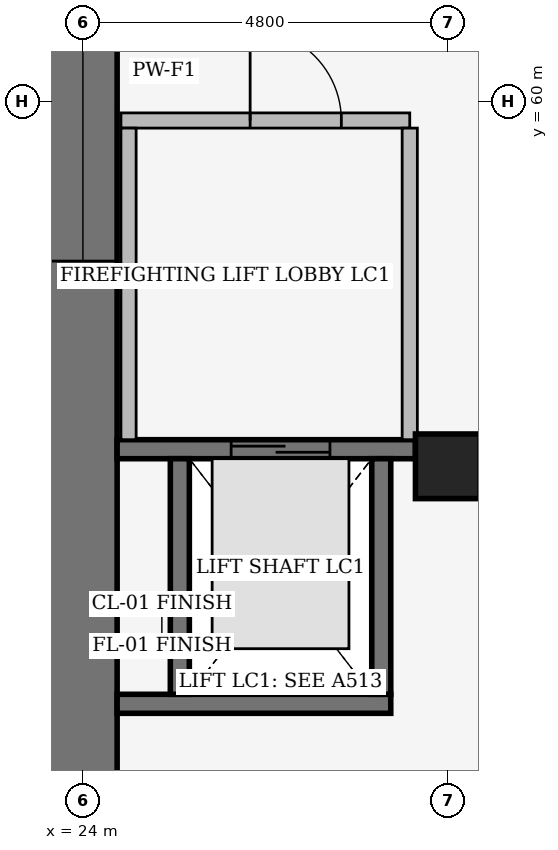
"""IFC4 building model, lengths in metres.
Left out: names, types, materials, properties, quantities, classifications, styles, units other than length and angle.
Written with IfcOpenShell. Run it as: python <this file> out.ifc"""

import sys

from ifc_helpers import new_model, si_unit, direction, frame, frame_2d, origin, origin_2d, place, context, subcontext, project, spatial, rectangle, extrude, element, fill, save


model = new_model("IFC4")
c1 = context("Model", 3, precision=1e-05, world=origin(), true_north=direction((0.0, 1.0)))
c2 = subcontext(c1, "Body", "Model", "MODEL_VIEW")
j1 = project(units=[si_unit("LENGTHUNIT", "METRE"), si_unit("PLANEANGLEUNIT", "RADIAN")], contexts=[c1])
p1 = place(None, origin())
s1 = spatial("IfcSite", under=j1, at=p1, CompositionType="ELEMENT")
p2 = place(p1, origin())
s2 = spatial("IfcBuilding", under=s1, at=p2, CompositionType="ELEMENT")
p3 = place(p2, origin())
s3 = spatial("IfcBuildingStorey", under=s2, at=p3, CompositionType="ELEMENT", Elevation=0.0)
p4 = place(p3, frame((28.8, 55.2, 0.0), z_axis=(0.0, 0.0, 1.0), x_axis=(1.0, 0.0, 0.0)))
e1 = element("IfcColumn", 1, at=p4, inside=s3, PredefinedType="COLUMN", context=c2, shape_type="SweptSolid", body=[
    extrude(rectangle(XDim=0.85, YDim=0.85, at=origin_2d()), origin(), (0.0, 0.0, 1.0), 5.4),
])
p5 = place(p3, frame((24.0, 50.85, 0.0), z_axis=(0.0, 0.0, 1.0), x_axis=(0.0, 1.0, 0.0)))
e2 = element("IfcWall", 2, at=p5, inside=s3, PredefinedType="SOLIDWALL", context=c2, shape_type="SweptSolid", body=[
    extrude(rectangle(XDim=18.3, YDim=0.9, at=frame_2d((9.15, 0.0))), origin(), (0.0, 0.0, 1.0), 5.0),
])
p6 = place(p5, frame((7.05, 0.0, 0.65)))
e3 = element("IfcOpeningElement", 3, at=p6, cuts=e2, PredefinedType="OPENING", context=c2, shape_type="SweptSolid", body=[
    extrude(rectangle(XDim=4.2, YDim=2.8, at=frame_2d((2.1, 1.4))), frame((0.0, 0.46, 0.0), z_axis=(0.0, -1.0, 0.0), x_axis=(1.0, 0.0, 0.0)), (0.0, 0.0, 1.0), 0.92),
])
p7 = place(p3, frame((24.45, 52.075, 0.0), z_axis=(0.0, 0.0, 1.0), x_axis=(1.0, 0.0, 0.0)))
e4 = element("IfcWall", 4, at=p7, inside=s3, PredefinedType="SHEAR", context=c2, shape_type="SweptSolid", body=[
    extrude(rectangle(XDim=3.6, YDim=0.25, at=frame_2d((1.8, 0.0))), origin(), (0.0, 0.0, 1.0), 5.0),
])
p8 = place(p3, frame((24.45, 55.425, 0.0), z_axis=(0.0, 0.0, 1.0), x_axis=(1.0, 0.0, 0.0)))
e5 = element("IfcWall", 5, at=p8, inside=s3, PredefinedType="SHEAR", context=c2, shape_type="SweptSolid", body=[
    extrude(rectangle(XDim=3.925, YDim=0.25, at=frame_2d((1.962, 0.0))), origin(), (0.0, 0.0, 1.0), 5.0),
])
p9 = place(p8, frame((1.5, 0.0, 0.0)))
e6 = element("IfcOpeningElement", 6, at=p9, cuts=e5, PredefinedType="OPENING", context=c2, shape_type="SweptSolid", body=[
    extrude(rectangle(XDim=1.3, YDim=2.2, at=frame_2d((0.65, 1.1))), frame((0.0, 0.135, 0.0), z_axis=(0.0, -1.0, 0.0), x_axis=(1.0, 0.0, 0.0)), (0.0, 0.0, 1.0), 0.27),
])
for number, where, z_axis, x_axis in (
    (7, (25.275, 52.2, 0.0), (0.0, 0.0, 1.0), (0.0, 1.0, 0.0)),
    (8, (27.925, 52.2, 0.0), (0.0, 0.0, 1.0), (0.0, 1.0, 0.0)),
):
    element("IfcWall", number, at=place(p3, frame(where, z_axis=z_axis, x_axis=x_axis)), inside=s3, PredefinedType="SHEAR", context=c2, shape_type="SweptSolid", body=[
        extrude(rectangle(XDim=3.1, YDim=0.25, at=frame_2d((1.55, 0.0))), origin(), (0.0, 0.0, 1.0), 5.0),
    ])
p10 = place(p3, frame((24.5, 59.75, 0.0), z_axis=(0.0, 0.0, 1.0), x_axis=(1.0, 0.0, 0.0)))
e9 = element("IfcWall", 9, at=p10, inside=s3, PredefinedType="PARTITIONING", context=c2, shape_type="SweptSolid", body=[
    extrude(rectangle(XDim=3.8, YDim=0.2, at=frame_2d((1.9, 0.0))), origin(), (0.0, 0.0, 1.0), 5.04),
])
p11 = place(p10, frame((1.7, 0.0, 0.0)))
e10 = element("IfcOpeningElement", 10, at=p11, cuts=e9, PredefinedType="OPENING", context=c2, shape_type="SweptSolid", body=[
    extrude(rectangle(XDim=1.2, YDim=2.2, at=frame_2d((0.6, 1.1))), frame((0.0, 0.11, 0.0), z_axis=(0.0, -1.0, 0.0), x_axis=(1.0, 0.0, 0.0)), (0.0, 0.0, 1.0), 0.22),
])
for number, where, z_axis, x_axis in (
    (11, (24.6, 55.55, 0.0), (0.0, 0.0, 1.0), (0.0, 1.0, 0.0)),
    (12, (28.3, 55.55, 0.0), (0.0, 0.0, 1.0), (0.0, 1.0, 0.0)),
):
    element("IfcWall", number, at=place(p3, frame(where, z_axis=z_axis, x_axis=x_axis)), inside=s3, PredefinedType="PARTITIONING", context=c2, shape_type="SweptSolid", body=[
        extrude(rectangle(XDim=4.1, YDim=0.2, at=frame_2d((2.05, 0.0))), origin(), (0.0, 0.0, 1.0), 5.04),
    ])
p12 = place(p6, origin())
e13 = element("IfcWindow", 13, at=p12, inside=s3, PartitioningType="SINGLE_PANEL", PredefinedType="WINDOW", context=c2, shape_type="SweptSolid", body=[
    extrude(rectangle(XDim=4.2, YDim=2.8, at=frame_2d((2.1, 1.4))), frame((0.0, 0.03, 0.0), z_axis=(0.0, -1.0, 0.0), x_axis=(1.0, 0.0, 0.0)), (0.0, 0.0, 1.0), 0.06),
])
fill(e3, e13)
p13 = place(p9, origin())
e14 = element("IfcDoor", 14, at=p13, inside=s3, OperationType="DOUBLE_DOOR_SLIDING", PredefinedType="DOOR", context=c2, shape_type="SweptSolid", body=[
    extrude(rectangle(XDim=1.3, YDim=2.2, at=frame_2d((0.65, 1.1))), frame((0.0, 0.025, 0.0), z_axis=(0.0, -1.0, 0.0), x_axis=(1.0, 0.0, 0.0)), (0.0, 0.0, 1.0), 0.05),
])
fill(e6, e14)
p14 = place(p11, origin())
e15 = element("IfcDoor", 15, at=p14, inside=s3, OperationType="SINGLE_SWING_LEFT", PredefinedType="DOOR", context=c2, shape_type="SweptSolid", body=[
    extrude(rectangle(XDim=1.2, YDim=2.2, at=frame_2d((0.6, 1.1))), frame((0.0, 0.025, 0.0), z_axis=(0.0, -1.0, 0.0), x_axis=(1.0, 0.0, 0.0)), (0.0, 0.0, 1.0), 0.05),
])
fill(e10, e15)
save(model, sys.argv[1])
